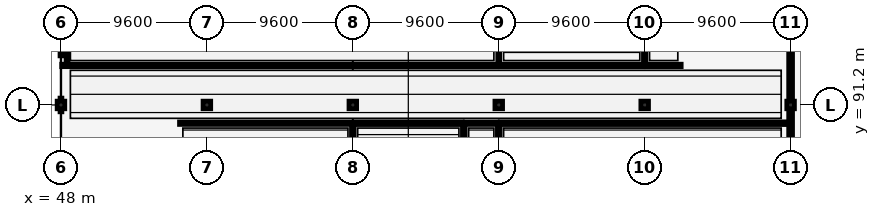
"""IFC4 building model, lengths in metres.
Left out: names, types, materials, properties, quantities, classifications, styles, units other than length and angle.
Written with IfcOpenShell. Run it as: python <this file> out.ifc"""

import sys

from ifc_helpers import new_model, si_unit, direction, frame, frame_2d, origin, origin_2d, place, context, subcontext, project, spatial, rectangle, extrude, element, fill, save


model = new_model("IFC4")
c1 = context("Model", 3, precision=1e-05, world=origin(), true_north=direction((0.0, 1.0)))
c2 = subcontext(c1, "Body", "Model", "MODEL_VIEW")
j1 = project(units=[si_unit("LENGTHUNIT", "METRE"), si_unit("PLANEANGLEUNIT", "RADIAN")], contexts=[c1])
p1 = place(None, origin())
s1 = spatial("IfcSite", under=j1, at=p1, CompositionType="ELEMENT")
p2 = place(p1, origin())
s2 = spatial("IfcBuilding", under=s1, at=p2, CompositionType="ELEMENT")
p3 = place(p2, frame((0.0, 0.0, 14.1)))
s3 = spatial("IfcBuildingStorey", under=s2, at=p3, CompositionType="ELEMENT", Elevation=14.1)
p4 = place(p3, frame((48.0, 91.2, 0.0), z_axis=(0.0, 0.0, 1.0), x_axis=(1.0, 0.0, 0.0)))
e1 = element("IfcColumn", 1, at=p4, inside=s3, PredefinedType="COLUMN", context=c2, shape_type="SweptSolid", body=[
    extrude(rectangle(XDim=0.5, YDim=0.5, at=origin_2d()), origin(), (0.0, 0.0, 1.0), 3.856),
])
for number, where, z_axis, x_axis in (
    (2, (57.6, 91.2, 0.0), (0.0, 0.0, 1.0), (1.0, 0.0, 0.0)),
    (3, (67.2, 91.2, 0.0), (0.0, 0.0, 1.0), (1.0, 0.0, 0.0)),
    (4, (76.8, 91.2, 0.0), (0.0, 0.0, 1.0), (1.0, 0.0, 0.0)),
    (5, (86.4, 91.2, 0.0), (0.0, 0.0, 1.0), (1.0, 0.0, 0.0)),
):
    element("IfcColumn", number, at=place(p3, frame(where, z_axis=z_axis, x_axis=x_axis)), inside=s3, PredefinedType="COLUMN", context=c2, shape_type="SweptSolid", body=[
        extrude(rectangle(XDim=0.5, YDim=0.5, at=origin_2d()), origin(), (0.0, 0.0, 1.0), 4.5),
    ])
p5 = place(p3, frame((96.0, 91.2, 0.0), z_axis=(0.0, 0.0, 1.0), x_axis=(1.0, 0.0, 0.0)))
e6 = element("IfcColumn", 6, at=p5, inside=s3, PredefinedType="COLUMN", context=c2, shape_type="SweptSolid", body=[
    extrude(rectangle(XDim=0.5, YDim=0.5, at=origin_2d()), origin(), (0.0, 0.0, 1.0), 3.705),
])
p6 = place(p3, frame((96.0, 81.85, 0.0), z_axis=(0.0, 0.0, 1.0), x_axis=(0.0, 1.0, 0.0)))
e7 = element("IfcWall", 7, at=p6, inside=s3, PredefinedType="STANDARD", context=c2, shape_type="SweptSolid", body=[
    extrude(rectangle(XDim=9.1, YDim=0.25, at=frame_2d((4.55, 0.0))), origin(), (0.0, 0.0, 1.0), 2.733),
])
p7 = place(p6, frame((3.0, 0.0, 1.0)))
e8 = element("IfcOpeningElement", 8, at=p7, cuts=e7, PredefinedType="OPENING", context=c2, shape_type="SweptSolid", body=[
    extrude(rectangle(XDim=1.16, YDim=1.47, at=frame_2d((0.58, 0.735))), frame((0.0, 0.135, 0.0), z_axis=(0.0, -1.0, 0.0), x_axis=(1.0, 0.0, 0.0)), (0.0, 0.0, 1.0), 0.27),
])
p8 = place(p3, frame((96.0, 91.45, 0.0), z_axis=(0.0, 0.0, 1.0), x_axis=(0.0, 1.0, 0.0)))
e9 = element("IfcWall", 9, at=p8, inside=s3, PredefinedType="STANDARD", context=c2, shape_type="SweptSolid", body=[
    extrude(rectangle(XDim=9.1, YDim=0.25, at=frame_2d((4.55, 0.0))), origin(), (0.0, 0.0, 1.0), 2.832),
])
p9 = place(p8, frame((3.2, 0.0, 0.0)))
e10 = element("IfcOpeningElement", 10, at=p9, cuts=e9, PredefinedType="OPENING", context=c2, shape_type="SweptSolid", body=[
    extrude(rectangle(XDim=1.48, YDim=2.11, at=frame_2d((0.74, 1.055))), frame((0.0, 0.135, 0.0), z_axis=(0.0, -1.0, 0.0), x_axis=(1.0, 0.0, 0.0)), (0.0, 0.0, 1.0), 0.27),
])
p10 = place(p3, frame((67.2, 81.4, 0.0), z_axis=(0.0, 0.0, 1.0), x_axis=(0.0, 1.0, 0.0)))
e11 = element("IfcWall", 11, at=p10, inside=s3, PredefinedType="PARTITIONING", context=c2, shape_type="SweptSolid", body=[
    extrude(rectangle(XDim=8.5, YDim=0.175, at=frame_2d((4.25, 0.0))), origin(), (0.0, 0.0, 1.0), 3.1),
])
p11 = place(p10, frame((3.71, 0.0, 0.0)))
e12 = element("IfcOpeningElement", 12, at=p11, cuts=e11, PredefinedType="OPENING", context=c2, shape_type="SweptSolid", body=[
    extrude(rectangle(XDim=1.08, YDim=2.18, at=frame_2d((0.54, 1.09))), frame((0.0, 0.097, 0.0), z_axis=(0.0, -1.0, 0.0), x_axis=(1.0, 0.0, 0.0)), (0.0, 0.0, 1.0), 0.195),
])
p12 = place(p3, frame((55.8, 90.0, 0.0), z_axis=(0.0, 0.0, 1.0), x_axis=(1.0, 0.0, 0.0)))
e13 = element("IfcWall", 13, at=p12, inside=s3, PredefinedType="PARTITIONING", context=c2, shape_type="SweptSolid", body=[
    extrude(rectangle(XDim=11.3, YDim=0.16, at=frame_2d((5.65, 0.0))), origin(), (0.0, 0.0, 1.0), 3.1),
])
p13 = place(p12, frame((4.75, 0.0, 0.0)))
e14 = element("IfcOpeningElement", 14, at=p13, cuts=e13, PredefinedType="OPENING", context=c2, shape_type="SweptSolid", body=[
    extrude(rectangle(XDim=1.8, YDim=2.15, at=frame_2d((0.9, 1.075))), frame((0.0, 0.09, 0.0), z_axis=(0.0, -1.0, 0.0), x_axis=(1.0, 0.0, 0.0)), (0.0, 0.0, 1.0), 0.18),
])
p14 = place(p3, frame((74.5, 81.4, 0.0), z_axis=(0.0, 0.0, 1.0), x_axis=(0.0, 1.0, 0.0)))
e15 = element("IfcWall", 15, at=p14, inside=s3, PredefinedType="PARTITIONING", context=c2, shape_type="SweptSolid", body=[
    extrude(rectangle(XDim=8.5, YDim=0.175, at=frame_2d((4.25, 0.0))), origin(), (0.0, 0.0, 1.0), 3.1),
])
p15 = place(p14, frame((3.71, 0.0, 0.0)))
e16 = element("IfcOpeningElement", 16, at=p15, cuts=e15, PredefinedType="OPENING", context=c2, shape_type="SweptSolid", body=[
    extrude(rectangle(XDim=1.08, YDim=2.18, at=frame_2d((0.54, 1.09))), frame((0.0, 0.097, 0.0), z_axis=(0.0, -1.0, 0.0), x_axis=(1.0, 0.0, 0.0)), (0.0, 0.0, 1.0), 0.195),
])
p16 = place(p3, frame((76.8, 72.05, 0.0), z_axis=(0.0, 0.0, 1.0), x_axis=(0.0, 1.0, 0.0)))
e17 = element("IfcWall", 17, at=p16, inside=s3, PredefinedType="PARTITIONING", context=c2, shape_type="SweptSolid", body=[
    extrude(rectangle(XDim=17.85, YDim=0.175, at=frame_2d((8.925, 0.0))), origin(), (0.0, 0.0, 1.0), 2.992),
])
p17 = place(p16, frame((6.812, 0.0, 0.0)))
e18 = element("IfcOpeningElement", 18, at=p17, cuts=e17, PredefinedType="OPENING", context=c2, shape_type="SweptSolid", body=[
    extrude(rectangle(XDim=1.0, YDim=2.15, at=frame_2d((0.5, 1.075))), frame((0.0, 0.097, 0.0), z_axis=(0.0, -1.0, 0.0), x_axis=(1.0, 0.0, 0.0)), (0.0, 0.0, 1.0), 0.195),
])
p18 = place(p3, frame((74.6, 90.0, 0.0), z_axis=(0.0, 0.0, 1.0), x_axis=(1.0, 0.0, 0.0)))
e19 = element("IfcWall", 19, at=p18, inside=s3, PredefinedType="PARTITIONING", context=c2, shape_type="SweptSolid", body=[
    extrude(rectangle(XDim=2.1, YDim=0.16, at=frame_2d((1.05, 0.0))), origin(), (0.0, 0.0, 1.0), 3.1),
])
p19 = place(p18, frame((0.36, 0.0, 0.0)))
e20 = element("IfcOpeningElement", 20, at=p19, cuts=e19, PredefinedType="OPENING", context=c2, shape_type="SweptSolid", body=[
    extrude(rectangle(XDim=1.0, YDim=2.15, at=frame_2d((0.5, 1.075))), frame((0.0, 0.09, 0.0), z_axis=(0.0, -1.0, 0.0), x_axis=(1.0, 0.0, 0.0)), (0.0, 0.0, 1.0), 0.18),
])
p20 = place(p3, frame((67.3, 90.0, 0.0), z_axis=(0.0, 0.0, 1.0), x_axis=(1.0, 0.0, 0.0)))
e21 = element("IfcWall", 21, at=p20, inside=s3, PredefinedType="PARTITIONING", context=c2, shape_type="SweptSolid", body=[
    extrude(rectangle(XDim=7.1, YDim=0.175, at=frame_2d((3.55, 0.0))), origin(), (0.0, 0.0, 1.0), 3.1),
])
p21 = place(p20, frame((3.01, 0.0, 0.0)))
e22 = element("IfcOpeningElement", 22, at=p21, cuts=e21, PredefinedType="OPENING", context=c2, shape_type="SweptSolid", body=[
    extrude(rectangle(XDim=1.08, YDim=2.18, at=frame_2d((0.54, 1.09))), frame((0.0, 0.097, 0.0), z_axis=(0.0, -1.0, 0.0), x_axis=(1.0, 0.0, 0.0)), (0.0, 0.0, 1.0), 0.195),
])
p22 = place(p3, frame((76.9, 90.0, 0.0), z_axis=(0.0, 0.0, 1.0), x_axis=(1.0, 0.0, 0.0)))
e23 = element("IfcWall", 23, at=p22, inside=s3, PredefinedType="PARTITIONING", context=c2, shape_type="SweptSolid", body=[
    extrude(rectangle(XDim=19.05, YDim=0.175, at=frame_2d((9.525, 0.0))), origin(), (0.0, 0.0, 1.0), 3.1),
])
p23 = place(p22, frame((7.292, 0.0, 0.0)))
e24 = element("IfcOpeningElement", 24, at=p23, cuts=e23, PredefinedType="OPENING", context=c2, shape_type="SweptSolid", body=[
    extrude(rectangle(XDim=1.0, YDim=2.15, at=frame_2d((0.5, 1.075))), frame((0.0, 0.097, 0.0), z_axis=(0.0, -1.0, 0.0), x_axis=(1.0, 0.0, 0.0)), (0.0, 0.0, 1.0), 0.195),
])
p24 = place(p3, frame((86.5, 93.8, 0.0), z_axis=(0.0, 0.0, 1.0), x_axis=(1.0, 0.0, 0.0)))
e25 = element("IfcWall", 25, at=p24, inside=s3, PredefinedType="PARTITIONING", context=c2, shape_type="SweptSolid", body=[
    extrude(rectangle(XDim=2.3, YDim=0.16, at=frame_2d((1.15, 0.0))), origin(), (0.0, 0.0, 1.0), 3.1),
])
p25 = place(p24, frame((0.25, 0.0, 0.0)))
e26 = element("IfcOpeningElement", 26, at=p25, cuts=e25, PredefinedType="OPENING", context=c2, shape_type="SweptSolid", body=[
    extrude(rectangle(XDim=1.8, YDim=2.15, at=frame_2d((0.9, 1.075))), frame((0.0, 0.09, 0.0), z_axis=(0.0, -1.0, 0.0), x_axis=(1.0, 0.0, 0.0)), (0.0, 0.0, 1.0), 0.18),
])
p26 = place(p3, frame((48.05, 93.8, 0.0), z_axis=(0.0, 0.0, 1.0), x_axis=(1.0, 0.0, 0.0)))
e27 = element("IfcWall", 27, at=p26, inside=s3, PredefinedType="PARTITIONING", context=c2, shape_type="SweptSolid", body=[
    extrude(rectangle(XDim=28.65, YDim=0.16, at=frame_2d((14.325, 0.0))), origin(), (0.0, 0.0, 1.0), 3.1),
])
p27 = place(p26, frame((13.85, 0.0, 0.0)))
e28 = element("IfcOpeningElement", 28, at=p27, cuts=e27, PredefinedType="OPENING", context=c2, shape_type="SweptSolid", body=[
    extrude(rectangle(XDim=0.95, YDim=2.15, at=frame_2d((0.475, 1.075))), frame((0.0, 0.09, 0.0), z_axis=(0.0, -1.0, 0.0), x_axis=(1.0, 0.0, 0.0)), (0.0, 0.0, 1.0), 0.18),
])
p28 = place(p3, frame((76.9, 93.8, 0.0), z_axis=(0.0, 0.0, 1.0), x_axis=(1.0, 0.0, 0.0)))
e29 = element("IfcWall", 29, at=p28, inside=s3, PredefinedType="PARTITIONING", context=c2, shape_type="SweptSolid", body=[
    extrude(rectangle(XDim=9.4, YDim=0.16, at=frame_2d((4.7, 0.0))), origin(), (0.0, 0.0, 1.0), 3.1),
])
p29 = place(p28, frame((4.18, 0.0, 0.0)))
e30 = element("IfcOpeningElement", 30, at=p29, cuts=e29, PredefinedType="OPENING", context=c2, shape_type="SweptSolid", body=[
    extrude(rectangle(XDim=1.04, YDim=2.18, at=frame_2d((0.52, 1.09))), frame((0.0, 0.09, 0.0), z_axis=(0.0, -1.0, 0.0), x_axis=(1.0, 0.0, 0.0)), (0.0, 0.0, 1.0), 0.18),
])
p30 = place(p3, frame((86.4, 93.9, 0.0), z_axis=(0.0, 0.0, 1.0), x_axis=(0.0, 1.0, 0.0)))
e31 = element("IfcWall", 31, at=p30, inside=s3, PredefinedType="PARTITIONING", context=c2, shape_type="SweptSolid", body=[
    extrude(rectangle(XDim=6.3, YDim=0.16, at=frame_2d((3.15, 0.0))), origin(), (0.0, 0.0, 1.0), 3.1),
])
p31 = place(p30, frame((2.63, 0.0, 0.0)))
e32 = element("IfcOpeningElement", 32, at=p31, cuts=e31, PredefinedType="OPENING", context=c2, shape_type="SweptSolid", body=[
    extrude(rectangle(XDim=1.04, YDim=2.18, at=frame_2d((0.52, 1.09))), frame((0.0, 0.09, 0.0), z_axis=(0.0, -1.0, 0.0), x_axis=(1.0, 0.0, 0.0)), (0.0, 0.0, 1.0), 0.18),
])
p32 = place(p3, frame((76.8, 93.9, 0.0), z_axis=(0.0, 0.0, 1.0), x_axis=(0.0, 1.0, 0.0)))
e33 = element("IfcWall", 33, at=p32, inside=s3, PredefinedType="PARTITIONING", context=c2, shape_type="SweptSolid", body=[
    extrude(rectangle(XDim=6.3, YDim=0.125, at=frame_2d((3.15, 0.0))), origin(), (0.0, 0.0, 1.0), 3.1),
])
p33 = place(p3, frame((48.4, 94.04, 0.0), z_axis=(0.0, 0.0, 1.0), x_axis=(0.0, 1.0, 0.0)))
e34 = element("IfcWall", 34, at=p33, inside=s3, PredefinedType="PARTITIONING", context=c2, shape_type="SweptSolid", body=[
    extrude(rectangle(XDim=23.91, YDim=0.125, at=frame_2d((11.955, 0.0))), origin(), (0.0, 0.0, 1.0), 3.1),
])
p34 = place(p9, origin())
e35 = element("IfcDoor", 35, at=p34, inside=s3, OperationType="DOUBLE_DOOR_SINGLE_SWING", PredefinedType="DOOR", context=c2, shape_type="SweptSolid", body=[
    extrude(rectangle(XDim=1.48, YDim=2.11, at=frame_2d((0.74, 1.055))), frame((0.0, 0.025, 0.0), z_axis=(0.0, -1.0, 0.0), x_axis=(1.0, 0.0, 0.0)), (0.0, 0.0, 1.0), 0.05),
])
fill(e10, e35)
p35 = place(p13, origin())
e36 = element("IfcDoor", 36, at=p35, inside=s3, OperationType="DOUBLE_DOOR_SINGLE_SWING", PredefinedType="DOOR", context=c2, shape_type="SweptSolid", body=[
    extrude(rectangle(XDim=1.8, YDim=2.15, at=frame_2d((0.9, 1.075))), frame((0.0, 0.025, 0.0), z_axis=(0.0, -1.0, 0.0), x_axis=(1.0, 0.0, 0.0)), (0.0, 0.0, 1.0), 0.05),
])
fill(e14, e36)
p36 = place(p19, origin())
e37 = element("IfcDoor", 37, at=p36, inside=s3, OperationType="SINGLE_SWING_RIGHT", PredefinedType="DOOR", context=c2, shape_type="SweptSolid", body=[
    extrude(rectangle(XDim=1.0, YDim=2.15, at=frame_2d((0.5, 1.075))), frame((0.0, 0.025, 0.0), z_axis=(0.0, -1.0, 0.0), x_axis=(1.0, 0.0, 0.0)), (0.0, 0.0, 1.0), 0.05),
])
fill(e20, e37)
p37 = place(p21, origin())
e38 = element("IfcDoor", 38, at=p37, inside=s3, OperationType="SINGLE_SWING_LEFT", PredefinedType="DOOR", context=c2, shape_type="SweptSolid", body=[
    extrude(rectangle(XDim=1.08, YDim=2.18, at=frame_2d((0.54, 1.09))), frame((0.0, 0.025, 0.0), z_axis=(0.0, -1.0, 0.0), x_axis=(1.0, 0.0, 0.0)), (0.0, 0.0, 1.0), 0.05),
])
fill(e22, e38)
p38 = place(p23, origin())
e39 = element("IfcDoor", 39, at=p38, inside=s3, OperationType="SINGLE_SWING_RIGHT", PredefinedType="DOOR", context=c2, shape_type="SweptSolid", body=[
    extrude(rectangle(XDim=1.0, YDim=2.15, at=frame_2d((0.5, 1.075))), frame((0.0, 0.025, 0.0), z_axis=(0.0, -1.0, 0.0), x_axis=(1.0, 0.0, 0.0)), (0.0, 0.0, 1.0), 0.05),
])
fill(e24, e39)
p39 = place(p25, origin())
e40 = element("IfcDoor", 40, at=p39, inside=s3, OperationType="DOUBLE_DOOR_SINGLE_SWING", PredefinedType="DOOR", context=c2, shape_type="SweptSolid", body=[
    extrude(rectangle(XDim=1.8, YDim=2.15, at=frame_2d((0.9, 1.075))), frame((0.0, 0.025, 0.0), z_axis=(0.0, -1.0, 0.0), x_axis=(1.0, 0.0, 0.0)), (0.0, 0.0, 1.0), 0.05),
])
fill(e26, e40)
p40 = place(p27, origin())
e41 = element("IfcDoor", 41, at=p40, inside=s3, OperationType="SINGLE_SWING_RIGHT", PredefinedType="DOOR", context=c2, shape_type="SweptSolid", body=[
    extrude(rectangle(XDim=0.95, YDim=2.15, at=frame_2d((0.475, 1.075))), frame((0.0, 0.025, 0.0), z_axis=(0.0, -1.0, 0.0), x_axis=(1.0, 0.0, 0.0)), (0.0, 0.0, 1.0), 0.05),
])
fill(e28, e41)
p41 = place(p29, origin())
e42 = element("IfcDoor", 42, at=p41, inside=s3, OperationType="SINGLE_SWING_LEFT", PredefinedType="DOOR", context=c2, shape_type="SweptSolid", body=[
    extrude(rectangle(XDim=1.04, YDim=2.18, at=frame_2d((0.52, 1.09))), frame((0.0, 0.025, 0.0), z_axis=(0.0, -1.0, 0.0), x_axis=(1.0, 0.0, 0.0)), (0.0, 0.0, 1.0), 0.05),
])
fill(e30, e42)
save(model, sys.argv[1])
